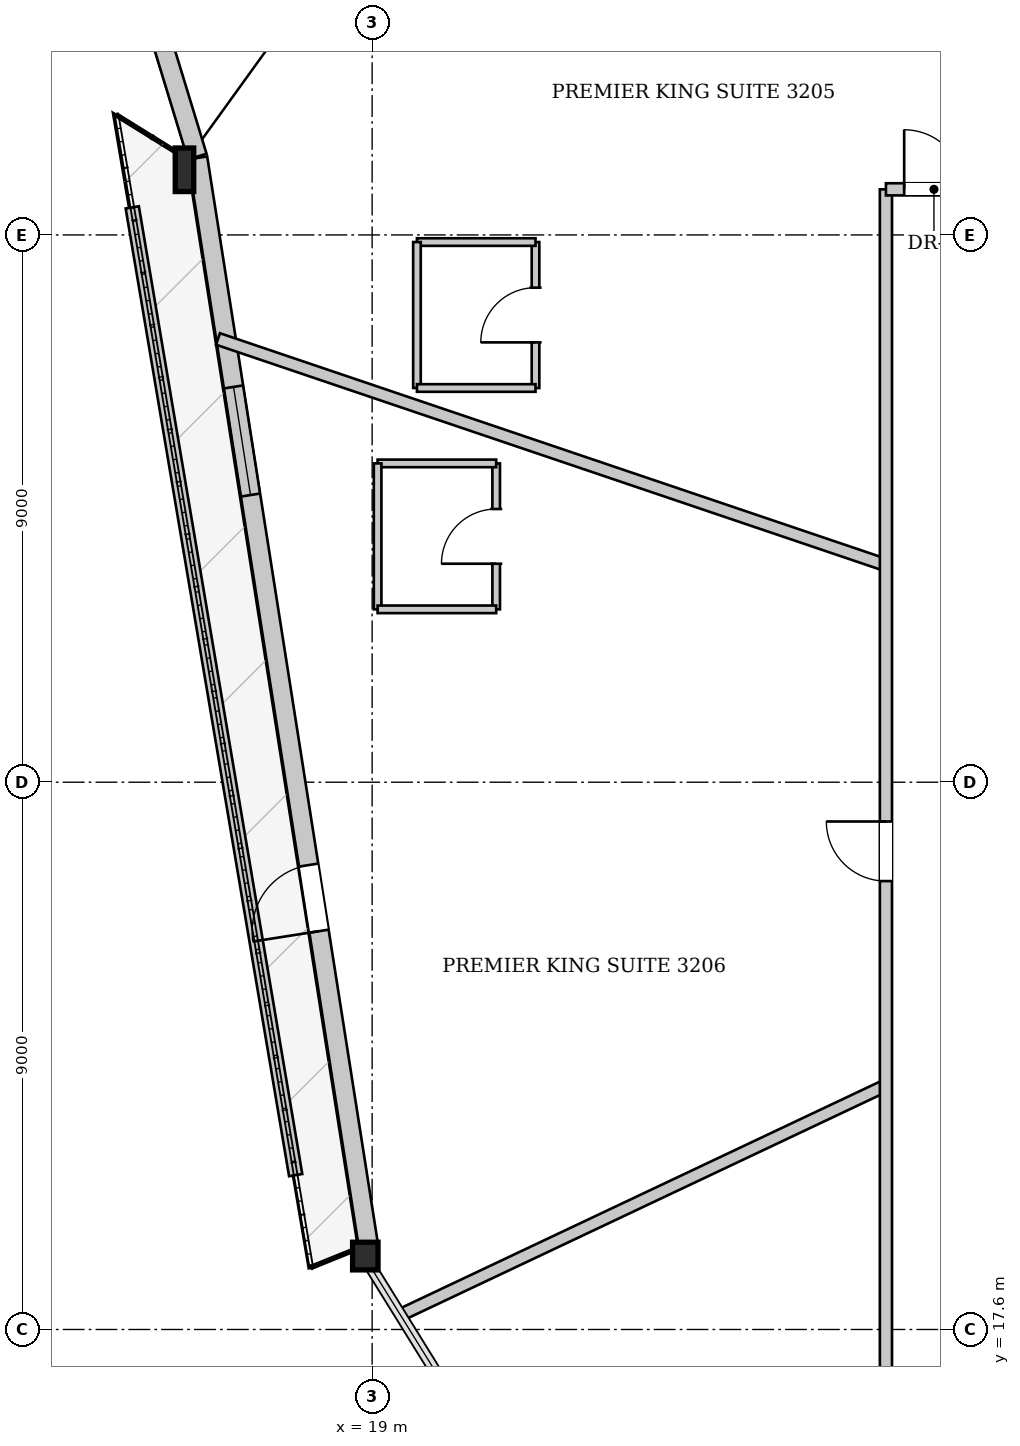
"""IFC4 building model, lengths in metres.
Left out: names, types, materials, properties, quantities, classifications, styles, units other than length and angle.
Written with IfcOpenShell. Run it as: python <this file> out.ifc"""

import sys

from ifc_helpers import new_model, si_unit, direction, frame, frame_2d, origin, origin_2d, place, context, subcontext, project, spatial, rectangle, i_section, extrude, source, transform, mapped, element, fill, save


model = new_model("IFC4")
c1 = context("Model", 3, precision=1e-05, world=origin(), true_north=direction((0.0, 1.0)))
c2 = subcontext(c1, "Body", "Model", "MODEL_VIEW")
j1 = project(units=[si_unit("LENGTHUNIT", "METRE"), si_unit("PLANEANGLEUNIT", "RADIAN")], contexts=[c1])
p1 = place(None, origin())
s1 = spatial("IfcSite", under=j1, at=p1, CompositionType="ELEMENT")
p2 = place(p1, origin())
s2 = spatial("IfcBuilding", under=s1, at=p2, CompositionType="ELEMENT")
p3 = place(p2, frame((0.0, 0.0, 123.45)))
s3 = spatial("IfcBuildingStorey", under=s2, at=p3, CompositionType="ELEMENT", Elevation=123.45)
m1 = source(origin(), c2, "Body", "SweptSolid", [
    extrude(i_section(OverallWidth=0.304, OverallDepth=0.716, WebThickness=0.021, FlangeThickness=0.04, at=origin_2d()), origin(), (0.0, 0.0, 1.0), 3.404),
])
p4 = place(p3, frame((15.971, 36.842, 0.0), z_axis=(-0.033494892307, -0.099767441541, 0.994446856196), x_axis=(0.947999571076, -0.318271602942, 0.0)))
e1 = element("IfcColumn", 1, at=p4, inside=s3, PredefinedType="COLUMN", context=c2, shape_type="MappedRepresentation", body=[
    mapped(m1, transform((0.0, 0.0, 0.0), x_axis=(1.0, 0.0, 0.0), y_axis=(0.0, 1.0, 0.0), z_axis=(0.0, 0.0, 1.0), scale=1.0)),
])
m2 = source(origin(), c2, "Body", "SweptSolid", [
    extrude(i_section(OverallWidth=0.418, OverallDepth=0.455, WebThickness=0.038, FlangeThickness=0.059, at=origin_2d()), origin(), (0.0, 0.0, 1.0), 3.402),
])
p5 = place(p3, frame((18.783, 18.94, 0.0), z_axis=(0.061719052088, -0.078010011185, 0.995040299065), x_axis=(0.784235971921, 0.620462682476, 0.0)))
e2 = element("IfcColumn", 2, at=p5, inside=s3, PredefinedType="COLUMN", context=c2, shape_type="MappedRepresentation", body=[
    mapped(m2, transform((0.0, 0.0, 0.0), x_axis=(1.0, 0.0, 0.0), y_axis=(0.0, 1.0, 0.0), z_axis=(0.0, 0.0, 1.0), scale=1.0)),
])
p6 = place(p3, frame((18.941, 18.965, 0.0), z_axis=(0.0, 0.0, 1.0), x_axis=(-0.155167584453, 0.987888162058, 0.0)))
e3 = element("IfcWall", 3, at=p6, inside=s3, PredefinedType="SOLIDWALL", context=c2, shape_type="SweptSolid", body=[
    extrude(rectangle(XDim=18.121, YDim=0.32, at=frame_2d((9.061, 0.0))), origin(), (0.0, 0.0, 1.0), 2.692),
])
p7 = place(p6, frame((5.249, 0.0, 0.0)))
e4 = element("IfcOpeningElement", 4, at=p7, cuts=e3, PredefinedType="OPENING", context=c2, shape_type="SweptSolid", body=[
    extrude(rectangle(XDim=1.1, YDim=2.3, at=frame_2d((0.55, 1.15))), frame((0.0, 0.17, 0.0), z_axis=(0.0, -1.0, 0.0), x_axis=(1.0, 0.0, 0.0)), (0.0, 0.0, 1.0), 0.34),
])
p8 = place(p6, frame((12.509, 0.0, 0.372)))
e5 = element("IfcOpeningElement", 5, at=p8, cuts=e3, PredefinedType="OPENING", context=c2, shape_type="SweptSolid", body=[
    extrude(rectangle(XDim=1.8, YDim=2.2, at=frame_2d((0.9, 1.1))), frame((0.0, 0.17, 0.0), z_axis=(0.0, -1.0, 0.0), x_axis=(1.0, 0.0, 0.0)), (0.0, 0.0, 1.0), 0.34),
])
p9 = place(p3, frame((16.124, 36.888, 0.0), z_axis=(0.0, 0.0, 1.0), x_axis=(-0.29180664309, 0.956477330128, 0.0)))
e6 = element("IfcWall", 6, at=p9, inside=s3, PredefinedType="SOLIDWALL", context=c2, shape_type="SweptSolid", body=[
    extrude(rectangle(XDim=2.952, YDim=0.32, at=frame_2d((1.476, 0.0))), origin(), (0.0, 0.0, 1.0), 2.692),
])
p10 = place(p3, frame((15.055, 36.053, 0.0), z_axis=(0.0, 0.0, 1.0), x_axis=(0.166510572337, -0.986039669232, 0.0)))
e7 = element("IfcWall", 7, at=p10, inside=s3, PredefinedType="PARAPET", context=c2, shape_type="SweptSolid", body=[
    extrude(rectangle(XDim=16.14, YDim=0.22, at=frame_2d((8.07, 0.0))), origin(), (0.0, 0.0, 1.0), 0.3),
])
p11 = place(p3, frame((27.45, 30.171, 0.0), z_axis=(0.0, 0.0, 1.0), x_axis=(-0.947210068389, 0.320613609103, 0.0)))
e8 = element("IfcWall", 8, at=p11, inside=s3, PredefinedType="PARTITIONING", context=c2, shape_type="SweptSolid", body=[
    extrude(rectangle(XDim=11.597, YDim=0.2, at=frame_2d((5.799, 0.0))), origin(), (0.0, 0.0, 1.0), 3.3),
])
p12 = place(p3, frame((27.45, 21.613, 0.0), z_axis=(0.0, 0.0, 1.0), x_axis=(-0.904088828609, -0.427344579917, 0.0)))
e9 = element("IfcWall", 9, at=p12, inside=s3, PredefinedType="PARTITIONING", context=c2, shape_type="SweptSolid", body=[
    extrude(rectangle(XDim=8.802, YDim=0.2, at=frame_2d((4.401, 0.0))), origin(), (0.0, 0.0, 1.0), 3.3),
])
p13 = place(p3, frame((21.687, 33.083, 0.0), z_axis=(0.0, 0.0, 1.0), x_axis=(0.0, 1.0, 0.0)))
e10 = element("IfcWall", 10, at=p13, inside=s3, PredefinedType="PARTITIONING", context=c2, shape_type="SweptSolid", body=[
    extrude(rectangle(XDim=2.4, YDim=0.125, at=frame_2d((1.2, 0.0))), origin(), (0.0, 0.0, 1.0), 2.925),
])
p14 = place(p13, frame((0.75, 0.0, 0.0)))
e11 = element("IfcOpeningElement", 11, at=p14, cuts=e10, PredefinedType="OPENING", context=c2, shape_type="SweptSolid", body=[
    extrude(rectangle(XDim=0.9, YDim=2.1, at=frame_2d((0.45, 1.05))), frame((0.0, 0.073, 0.0), z_axis=(0.0, -1.0, 0.0), x_axis=(1.0, 0.0, 0.0)), (0.0, 0.0, 1.0), 0.145),
])
p15 = place(p3, frame((21.687, 35.483, 0.0), z_axis=(0.0, 0.0, 1.0), x_axis=(-1.0, 0.0, 0.0)))
e12 = element("IfcWall", 12, at=p15, inside=s3, PredefinedType="PARTITIONING", context=c2, shape_type="SweptSolid", body=[
    extrude(rectangle(XDim=1.95, YDim=0.125, at=frame_2d((0.975, 0.0))), origin(), (0.0, 0.0, 1.0), 3.3),
])
p16 = place(p3, frame((19.737, 35.483, 0.0), z_axis=(0.0, 0.0, 1.0), x_axis=(0.0, -1.0, 0.0)))
e13 = element("IfcWall", 13, at=p16, inside=s3, PredefinedType="PARTITIONING", context=c2, shape_type="SweptSolid", body=[
    extrude(rectangle(XDim=2.4, YDim=0.125, at=frame_2d((1.2, 0.0))), origin(), (0.0, 0.0, 1.0), 3.3),
])
p17 = place(p3, frame((19.737, 33.083, 0.0), z_axis=(0.0, 0.0, 1.0), x_axis=(1.0, 0.0, 0.0)))
e14 = element("IfcWall", 14, at=p17, inside=s3, PredefinedType="PARTITIONING", context=c2, shape_type="SweptSolid", body=[
    extrude(rectangle(XDim=1.95, YDim=0.125, at=frame_2d((0.975, 0.0))), origin(), (0.0, 0.0, 1.0), 3.3),
])
p18 = place(p3, frame((21.04, 29.443, 0.0), z_axis=(0.0, 0.0, 1.0), x_axis=(0.0, 1.0, 0.0)))
e15 = element("IfcWall", 15, at=p18, inside=s3, PredefinedType="PARTITIONING", context=c2, shape_type="SweptSolid", body=[
    extrude(rectangle(XDim=2.4, YDim=0.125, at=frame_2d((1.2, 0.0))), origin(), (0.0, 0.0, 1.0), 3.3),
])
p19 = place(p18, frame((0.75, 0.0, 0.0)))
e16 = element("IfcOpeningElement", 16, at=p19, cuts=e15, PredefinedType="OPENING", context=c2, shape_type="SweptSolid", body=[
    extrude(rectangle(XDim=0.9, YDim=2.1, at=frame_2d((0.45, 1.05))), frame((0.0, 0.073, 0.0), z_axis=(0.0, -1.0, 0.0), x_axis=(1.0, 0.0, 0.0)), (0.0, 0.0, 1.0), 0.145),
])
p20 = place(p3, frame((21.04, 31.843, 0.0), z_axis=(0.0, 0.0, 1.0), x_axis=(-1.0, 0.0, 0.0)))
e17 = element("IfcWall", 17, at=p20, inside=s3, PredefinedType="PARTITIONING", context=c2, shape_type="SweptSolid", body=[
    extrude(rectangle(XDim=1.95, YDim=0.125, at=frame_2d((0.975, 0.0))), origin(), (0.0, 0.0, 1.0), 3.3),
])
p21 = place(p3, frame((19.09, 31.843, 0.0), z_axis=(0.0, 0.0, 1.0), x_axis=(0.0, -1.0, 0.0)))
e18 = element("IfcWall", 18, at=p21, inside=s3, PredefinedType="PARTITIONING", context=c2, shape_type="SweptSolid", body=[
    extrude(rectangle(XDim=2.4, YDim=0.125, at=frame_2d((1.2, 0.0))), origin(), (0.0, 0.0, 1.0), 3.3),
])
p22 = place(p3, frame((19.09, 29.443, 0.0), z_axis=(0.0, 0.0, 1.0), x_axis=(1.0, 0.0, 0.0)))
e19 = element("IfcWall", 19, at=p22, inside=s3, PredefinedType="PARTITIONING", context=c2, shape_type="SweptSolid", body=[
    extrude(rectangle(XDim=1.95, YDim=0.125, at=frame_2d((0.975, 0.0))), origin(), (0.0, 0.0, 1.0), 3.3),
])
p23 = place(p3, frame((27.45, 16.85, 0.0), z_axis=(0.0, 0.0, 1.0), x_axis=(0.0, 1.0, 0.0)))
e20 = element("IfcWall", 20, at=p23, inside=s3, PredefinedType="PARTITIONING", context=c2, shape_type="SweptSolid", body=[
    extrude(rectangle(XDim=19.5, YDim=0.2, at=frame_2d((9.75, 0.0))), origin(), (0.0, 0.0, 1.0), 3.3),
])
p24 = place(p23, frame((8.124, 0.0, 0.0)))
e21 = element("IfcOpeningElement", 21, at=p24, cuts=e20, PredefinedType="OPENING", context=c2, shape_type="SweptSolid", body=[
    extrude(rectangle(XDim=0.98, YDim=2.15, at=frame_2d((0.49, 1.075))), frame((0.0, 0.11, 0.0), z_axis=(0.0, -1.0, 0.0), x_axis=(1.0, 0.0, 0.0)), (0.0, 0.0, 1.0), 0.22),
])
p25 = place(p3, frame((27.45, 36.35, 0.0), z_axis=(0.0, 0.0, 1.0), x_axis=(1.0, 0.0, 0.0)))
e22 = element("IfcWall", 22, at=p25, inside=s3, PredefinedType="PARTITIONING", context=c2, shape_type="SweptSolid", body=[
    extrude(rectangle(XDim=21.1, YDim=0.2, at=frame_2d((10.55, 0.0))), origin(), (0.0, 0.0, 1.0), 3.3),
])
p26 = place(p25, frame((19.788, 0.0, 0.0)))
e23 = element("IfcOpeningElement", 23, at=p26, cuts=e22, PredefinedType="OPENING", context=c2, shape_type="SweptSolid", body=[
    extrude(rectangle(XDim=0.98, YDim=2.15, at=frame_2d((0.49, 1.075))), frame((0.0, 0.11, 0.0), z_axis=(0.0, -1.0, 0.0), x_axis=(1.0, 0.0, 0.0)), (0.0, 0.0, 1.0), 0.22),
])
p27 = place(p25, frame((10.147, 0.0, 0.0)))
e24 = element("IfcOpeningElement", 24, at=p27, cuts=e22, PredefinedType="OPENING", context=c2, shape_type="SweptSolid", body=[
    extrude(rectangle(XDim=0.98, YDim=2.15, at=frame_2d((0.49, 1.075))), frame((0.0, 0.11, 0.0), z_axis=(0.0, -1.0, 0.0), x_axis=(1.0, 0.0, 0.0)), (0.0, 0.0, 1.0), 0.22),
])
p28 = place(p25, frame((0.3, 0.0, 0.0)))
e25 = element("IfcOpeningElement", 25, at=p28, cuts=e22, PredefinedType="OPENING", context=c2, shape_type="SweptSolid", body=[
    extrude(rectangle(XDim=0.98, YDim=2.15, at=frame_2d((0.49, 1.075))), frame((0.0, 0.11, 0.0), z_axis=(0.0, -1.0, 0.0), x_axis=(1.0, 0.0, 0.0)), (0.0, 0.0, 1.0), 0.22),
])
m3 = source(origin(), c2, "Body", "SweptSolid", [
    extrude(rectangle(XDim=1.1, YDim=2.3, at=frame_2d((0.55, 1.15))), frame((0.0, 0.025, 0.0), z_axis=(0.0, -1.0, 0.0), x_axis=(1.0, 0.0, 0.0)), (0.0, 0.0, 1.0), 0.05),
])
p29 = place(p7, origin())
e26 = element("IfcDoor", 26, at=p29, inside=s3, OperationType="SINGLE_SWING_LEFT", PredefinedType="DOOR", context=c2, shape_type="MappedRepresentation", body=[
    mapped(m3, transform((0.0, 0.0, 0.0), x_axis=(1.0, 0.0, 0.0), y_axis=(0.0, 1.0, 0.0), z_axis=(0.0, 0.0, 1.0), scale=1.0)),
])
fill(e4, e26)
m4 = source(origin(), c2, "Body", "SweptSolid", [
    extrude(rectangle(XDim=1.8, YDim=2.2, at=frame_2d((0.9, 1.1))), frame((0.0, 0.03, 0.0), z_axis=(0.0, -1.0, 0.0), x_axis=(1.0, 0.0, 0.0)), (0.0, 0.0, 1.0), 0.06),
])
p30 = place(p8, origin())
e27 = element("IfcWindow", 27, at=p30, inside=s3, PartitioningType="SINGLE_PANEL", PredefinedType="WINDOW", context=c2, shape_type="MappedRepresentation", body=[
    mapped(m4, transform((0.0, 0.0, 0.0), x_axis=(1.0, 0.0, 0.0), y_axis=(0.0, 1.0, 0.0), z_axis=(0.0, 0.0, 1.0), scale=1.0)),
])
fill(e5, e27)
m5 = source(origin(), c2, "Body", "SweptSolid", [
    extrude(rectangle(XDim=0.9, YDim=2.1, at=frame_2d((0.45, 1.05))), frame((0.0, 0.025, 0.0), z_axis=(0.0, -1.0, 0.0), x_axis=(1.0, 0.0, 0.0)), (0.0, 0.0, 1.0), 0.05),
])
p31 = place(p14, origin())
e28 = element("IfcDoor", 28, at=p31, inside=s3, OperationType="SINGLE_SWING_LEFT", PredefinedType="DOOR", context=c2, shape_type="MappedRepresentation", body=[
    mapped(m5, transform((0.0, 0.0, 0.0), x_axis=(1.0, 0.0, 0.0), y_axis=(0.0, 1.0, 0.0), z_axis=(0.0, 0.0, 1.0), scale=1.0)),
])
fill(e11, e28)
p32 = place(p19, origin())
e29 = element("IfcDoor", 29, at=p32, inside=s3, OperationType="SINGLE_SWING_LEFT", PredefinedType="DOOR", context=c2, shape_type="MappedRepresentation", body=[
    mapped(m5, transform((0.0, 0.0, 0.0), x_axis=(1.0, 0.0, 0.0), y_axis=(0.0, 1.0, 0.0), z_axis=(0.0, 0.0, 1.0), scale=1.0)),
])
fill(e16, e29)
m6 = source(origin(), c2, "Body", "SweptSolid", [
    extrude(rectangle(XDim=0.98, YDim=2.15, at=frame_2d((0.49, 1.075))), frame((0.0, 0.025, 0.0), z_axis=(0.0, -1.0, 0.0), x_axis=(1.0, 0.0, 0.0)), (0.0, 0.0, 1.0), 0.05),
])
p33 = place(p24, origin())
e30 = element("IfcDoor", 30, at=p33, inside=s3, OperationType="SINGLE_SWING_RIGHT", PredefinedType="DOOR", context=c2, shape_type="MappedRepresentation", body=[
    mapped(m6, transform((0.0, 0.0, 0.0), x_axis=(1.0, 0.0, 0.0), y_axis=(0.0, 1.0, 0.0), z_axis=(0.0, 0.0, 1.0), scale=1.0)),
])
fill(e21, e30)
p34 = place(p28, origin())
e31 = element("IfcDoor", 31, at=p34, inside=s3, OperationType="SINGLE_SWING_LEFT", PredefinedType="DOOR", context=c2, shape_type="MappedRepresentation", body=[
    mapped(m6, transform((0.0, 0.0, 0.0), x_axis=(1.0, 0.0, 0.0), y_axis=(0.0, 1.0, 0.0), z_axis=(0.0, 0.0, 1.0), scale=1.0)),
])
fill(e25, e31)
save(model, sys.argv[1])
